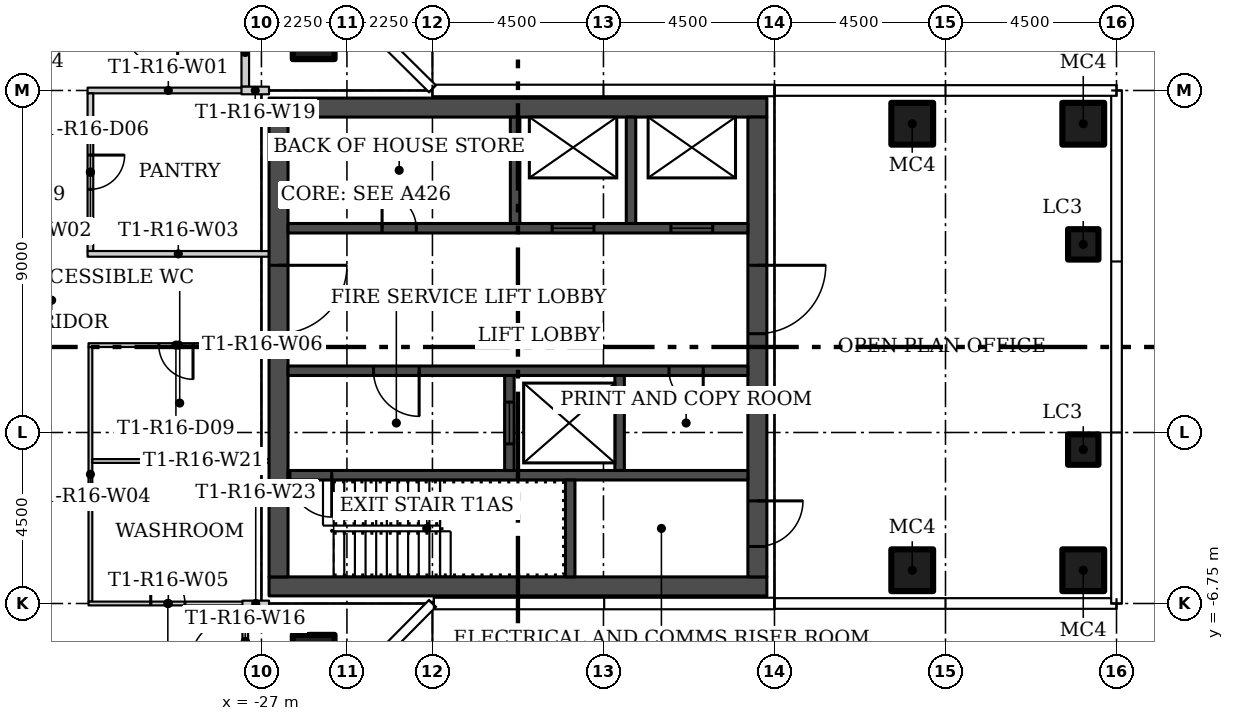
"""IFC4 building model, lengths in metres.
Left out: names, types, materials, properties, quantities, classifications, styles, units other than length and angle.
Written with IfcOpenShell. Run it as: python <this file> out.ifc"""

import sys

from ifc_helpers import new_model, si_unit, direction, frame, frame_2d, origin, origin_2d, place, context, subcontext, project, spatial, rectangle, hollow_rectangle, extrude, element, fill, save


model = new_model("IFC4")
c1 = context("Model", 3, precision=1e-05, world=origin(), true_north=direction((0.0, 1.0)))
c2 = subcontext(c1, "Body", "Model", "MODEL_VIEW")
j1 = project(units=[si_unit("LENGTHUNIT", "METRE"), si_unit("PLANEANGLEUNIT", "RADIAN")], contexts=[c1])
p1 = place(None, origin())
s1 = spatial("IfcSite", under=j1, at=p1, CompositionType="ELEMENT")
p2 = place(p1, origin())
s2 = spatial("IfcBuilding", under=s1, at=p2, CompositionType="ELEMENT")
p3 = place(p2, frame((0.0, 0.0, 146.7)))
s3 = spatial("IfcBuildingStorey", under=s2, at=p3, CompositionType="ELEMENT", Elevation=146.7)
for number, where in (
    (1, (-25.625, 8.125, 0.0)),
    (2, (-25.625, -8.125, 0.0)),
    (3, (-9.875, -5.875, 0.0)),
    (4, (-5.375, -5.875, 0.0)),
    (5, (-9.875, 5.875, 0.0)),
    (6, (-5.375, 5.875, 0.0)),
):
    element("IfcColumn", number, at=place(p3, frame(where)), inside=s3, PredefinedType="COLUMN", context=c2, shape_type="SweptSolid", body=[
        extrude(hollow_rectangle(XDim=1.1, YDim=1.1, WallThickness=0.04, at=origin_2d()), origin(), (0.0, 0.0, 1.0), 3.55),
    ])
for number, where in (
    (7, (-5.375, -2.7, 0.0)),
    (8, (-5.375, 2.7, 0.0)),
):
    element("IfcColumn", number, at=place(p3, frame(where)), inside=s3, PredefinedType="COLUMN", context=c2, shape_type="SweptSolid", body=[
        extrude(hollow_rectangle(XDim=0.8, YDim=0.8, WallThickness=0.03, at=origin_2d()), origin(), (0.0, 0.0, 1.0), 3.55),
    ])
p4 = place(p3, frame((-27.325, 6.75, 0.0), z_axis=(0.0, 0.0, 1.0), x_axis=(-1.0, 0.0, 0.0)))
e9 = element("IfcWall", 9, at=p4, inside=s3, PredefinedType="PARTITIONING", context=c2, shape_type="SweptSolid", body=[
    extrude(rectangle(XDim=4.25, YDim=0.15, at=frame_2d((2.125, 0.0))), origin(), (0.0, 0.0, 1.0), 3.55),
])
p5 = place(p3, frame((-31.5, 6.675, 0.0), z_axis=(0.0, 0.0, 1.0), x_axis=(0.0, -1.0, 0.0)))
e10 = element("IfcWall", 10, at=p5, inside=s3, PredefinedType="PARTITIONING", context=c2, shape_type="SweptSolid", body=[
    extrude(rectangle(XDim=4.15, YDim=0.15, at=frame_2d((2.075, 0.0))), origin(), (0.0, 0.0, 1.0), 3.55),
])
p6 = place(p5, frame((1.625, 0.0, 0.0)))
e11 = element("IfcOpeningElement", 11, at=p6, cuts=e10, PredefinedType="OPENING", context=c2, shape_type="SweptSolid", body=[
    extrude(rectangle(XDim=0.9, YDim=2.1, at=frame_2d((0.45, 1.05))), frame((0.0, 0.085, 0.0), z_axis=(0.0, -1.0, 0.0), x_axis=(1.0, 0.0, 0.0)), (0.0, 0.0, 1.0), 0.17),
])
p7 = place(p3, frame((-31.575, 2.45, 0.0)))
e12 = element("IfcWall", 12, at=p7, inside=s3, PredefinedType="PARTITIONING", context=c2, shape_type="SweptSolid", body=[
    extrude(rectangle(XDim=4.775, YDim=0.15, at=frame_2d((2.387, 0.0))), origin(), (0.0, 0.0, 1.0), 3.55),
])
p8 = place(p3, frame((-31.5, -0.0, 0.0), z_axis=(0.0, 0.0, 1.0), x_axis=(0.0, -1.0, 0.0)))
e13 = element("IfcWall", 13, at=p8, inside=s3, PredefinedType="PARTITIONING", context=c2, shape_type="SweptSolid", body=[
    extrude(rectangle(XDim=6.7, YDim=0.1, at=frame_2d((3.35, 0.0))), origin(), (0.0, 0.0, 1.0), 3.55),
])
p9 = place(p3, frame((-31.55, -6.75, 0.0)))
e14 = element("IfcWall", 14, at=p9, inside=s3, PredefinedType="PARTITIONING", context=c2, shape_type="SweptSolid", body=[
    extrude(rectangle(XDim=4.2, YDim=0.1, at=frame_2d((2.1, 0.0))), origin(), (0.0, 0.0, 1.0), 3.55),
])
p10 = place(p9, frame((1.638, 0.0, 0.0)))
e15 = element("IfcOpeningElement", 15, at=p10, cuts=e14, PredefinedType="OPENING", context=c2, shape_type="SweptSolid", body=[
    extrude(rectangle(XDim=0.9, YDim=2.1, at=frame_2d((0.45, 1.05))), frame((0.0, 0.06, 0.0), z_axis=(0.0, -1.0, 0.0), x_axis=(1.0, 0.0, 0.0)), (0.0, 0.0, 1.0), 0.12),
])
p11 = place(p3, frame((-26.8, 0.05, 0.0), z_axis=(0.0, 0.0, 1.0), x_axis=(-1.0, 0.0, 0.0)))
e16 = element("IfcWall", 16, at=p11, inside=s3, PredefinedType="PARTITIONING", context=c2, shape_type="SweptSolid", body=[
    extrude(rectangle(XDim=4.75, YDim=0.1, at=frame_2d((2.375, 0.0))), origin(), (0.0, 0.0, 1.0), 3.55),
])
p12 = place(p11, frame((2.0, 0.0, 0.0)))
e17 = element("IfcOpeningElement", 17, at=p12, cuts=e16, PredefinedType="OPENING", context=c2, shape_type="SweptSolid", body=[
    extrude(rectangle(XDim=0.9, YDim=2.1, at=frame_2d((0.45, 1.05))), frame((0.0, 0.06, 0.0), z_axis=(0.0, -1.0, 0.0), x_axis=(1.0, 0.0, 0.0)), (0.0, 0.0, 1.0), 0.12),
])
p13 = place(p3, frame((-27.425, 6.85, 0.0), z_axis=(0.0, 0.0, 1.0), x_axis=(0.0, 1.0, 0.0)))
e18 = element("IfcWall", 18, at=p13, inside=s3, PredefinedType="PARTITIONING", context=c2, shape_type="SweptSolid", body=[
    extrude(rectangle(XDim=1.8, YDim=0.2, at=frame_2d((0.9, 0.0))), origin(), (0.0, 0.0, 1.0), 3.55),
])
p14 = place(p3, frame((-27.425, -8.675, 0.0), z_axis=(0.0, 0.0, 1.0), x_axis=(0.0, 1.0, 0.0)))
e19 = element("IfcWall", 19, at=p14, inside=s3, PredefinedType="PARTITIONING", context=c2, shape_type="SweptSolid", body=[
    extrude(rectangle(XDim=1.85, YDim=0.15, at=frame_2d((0.925, 0.0))), origin(), (0.0, 0.0, 1.0), 3.55),
])
p15 = place(p14, frame((0.175, 0.0, 0.0)))
e20 = element("IfcOpeningElement", 20, at=p15, cuts=e19, PredefinedType="OPENING", context=c2, shape_type="SweptSolid", body=[
    extrude(rectangle(XDim=1.5, YDim=2.1, at=frame_2d((0.75, 1.05))), frame((0.0, 0.085, 0.0), z_axis=(0.0, -1.0, 0.0), x_axis=(1.0, 0.0, 0.0)), (0.0, 0.0, 1.0), 0.17),
])
p16 = place(p3, frame((-26.8, 6.75, 0.0), z_axis=(0.0, 0.0, 1.0), x_axis=(-1.0, 0.0, 0.0)))
e21 = element("IfcWall", 21, at=p16, inside=s3, PredefinedType="PARTITIONING", context=c2, shape_type="SweptSolid", body=[
    extrude(rectangle(XDim=0.725, YDim=0.2, at=frame_2d((0.362, 0.0))), origin(), (0.0, 0.0, 1.0), 3.55),
])
p17 = place(p3, frame((-26.8, -3.0, 0.0), z_axis=(0.0, 0.0, 1.0), x_axis=(-1.0, 0.0, 0.0)))
e22 = element("IfcWall", 22, at=p17, inside=s3, PredefinedType="PARTITIONING", context=c2, shape_type="SweptSolid", body=[
    extrude(rectangle(XDim=4.65, YDim=0.1, at=frame_2d((2.325, 0.0))), origin(), (0.0, 0.0, 1.0), 3.55),
])
p18 = place(p3, frame((-27.5, -6.75, 0.0)))
e23 = element("IfcWall", 23, at=p18, inside=s3, PredefinedType="PARTITIONING", context=c2, shape_type="SweptSolid", body=[
    extrude(rectangle(XDim=0.7, YDim=0.15, at=frame_2d((0.35, 0.0))), origin(), (0.0, 0.0, 1.0), 3.55),
])
for number, where in (
    (24, (-26.8, -6.3, 0.0)),
    (25, (-26.8, 6.3, 0.0)),
):
    element("IfcWall", number, at=place(p3, frame(where)), inside=s3, PredefinedType="SHEAR", context=c2, shape_type="SweptSolid", body=[
        extrude(rectangle(XDim=13.1, YDim=0.5, at=frame_2d((6.55, 0.0))), origin(), (0.0, 0.0, 1.0), 3.55),
    ])
p19 = place(p3, frame((-26.55, 6.05, 0.0), z_axis=(0.0, 0.0, 1.0), x_axis=(0.0, -1.0, 0.0)))
e26 = element("IfcWall", 26, at=p19, inside=s3, PredefinedType="SHEAR", context=c2, shape_type="SweptSolid", body=[
    extrude(rectangle(XDim=12.1, YDim=0.5, at=frame_2d((6.05, 0.0))), origin(), (0.0, 0.0, 1.0), 3.55),
])
p20 = place(p19, frame((3.9, 0.0, 0.0)))
e27 = element("IfcOpeningElement", 27, at=p20, cuts=e26, PredefinedType="OPENING", context=c2, shape_type="SweptSolid", body=[
    extrude(rectangle(XDim=1.8, YDim=2.4, at=frame_2d((0.9, 1.2))), frame((0.0, 0.26, 0.0), z_axis=(0.0, -1.0, 0.0), x_axis=(1.0, 0.0, 0.0)), (0.0, 0.0, 1.0), 0.52),
])
p21 = place(p3, frame((-13.95, 6.05, 0.0), z_axis=(0.0, 0.0, 1.0), x_axis=(0.0, -1.0, 0.0)))
e28 = element("IfcWall", 28, at=p21, inside=s3, PredefinedType="SHEAR", context=c2, shape_type="SweptSolid", body=[
    extrude(rectangle(XDim=12.1, YDim=0.5, at=frame_2d((6.05, 0.0))), origin(), (0.0, 0.0, 1.0), 3.55),
])
p22 = place(p21, frame((10.1, 0.0, 0.0)))
e29 = element("IfcOpeningElement", 29, at=p22, cuts=e28, PredefinedType="OPENING", context=c2, shape_type="SweptSolid", body=[
    extrude(rectangle(XDim=1.2, YDim=2.1, at=frame_2d((0.6, 1.05))), frame((0.0, 0.26, 0.0), z_axis=(0.0, -1.0, 0.0), x_axis=(1.0, 0.0, 0.0)), (0.0, 0.0, 1.0), 0.52),
])
p23 = place(p21, frame((3.9, 0.0, 0.0)))
e30 = element("IfcOpeningElement", 30, at=p23, cuts=e28, PredefinedType="OPENING", context=c2, shape_type="SweptSolid", body=[
    extrude(rectangle(XDim=1.8, YDim=2.4, at=frame_2d((0.9, 1.2))), frame((0.0, 0.26, 0.0), z_axis=(0.0, -1.0, 0.0), x_axis=(1.0, 0.0, 0.0)), (0.0, 0.0, 1.0), 0.52),
])
p24 = place(p3, frame((-14.2, -3.375, 0.0), z_axis=(0.0, 0.0, 1.0), x_axis=(-1.0, 0.0, 0.0)))
e31 = element("IfcWall", 31, at=p24, inside=s3, PredefinedType="SHEAR", context=c2, shape_type="SweptSolid", body=[
    extrude(rectangle(XDim=12.1, YDim=0.25, at=frame_2d((6.05, 0.0))), origin(), (0.0, 0.0, 1.0), 3.55),
])
p25 = place(p24, frame((10.95, 0.0, 0.0)))
e32 = element("IfcOpeningElement", 32, at=p25, cuts=e31, PredefinedType="OPENING", context=c2, shape_type="SweptSolid", body=[
    extrude(rectangle(XDim=1.1, YDim=2.1, at=frame_2d((0.55, 1.05))), frame((0.0, 0.135, 0.0), z_axis=(0.0, -1.0, 0.0), x_axis=(1.0, 0.0, 0.0)), (0.0, 0.0, 1.0), 0.27),
])
p26 = place(p3, frame((-18.875, -6.05, 0.0), z_axis=(0.0, 0.0, 1.0), x_axis=(0.0, 1.0, 0.0)))
e33 = element("IfcWall", 33, at=p26, inside=s3, PredefinedType="SHEAR", context=c2, shape_type="SweptSolid", body=[
    extrude(rectangle(XDim=2.55, YDim=0.25, at=frame_2d((1.275, 0.0))), origin(), (0.0, 0.0, 1.0), 3.55),
])
p27 = place(p3, frame((-14.2, -0.625, 0.0), z_axis=(0.0, 0.0, 1.0), x_axis=(-1.0, 0.0, 0.0)))
e34 = element("IfcWall", 34, at=p27, inside=s3, PredefinedType="SHEAR", context=c2, shape_type="SweptSolid", body=[
    extrude(rectangle(XDim=12.1, YDim=0.25, at=frame_2d((6.05, 0.0))), origin(), (0.0, 0.0, 1.0), 3.55),
])
p28 = place(p27, frame((8.65, 0.0, 0.0)))
e35 = element("IfcOpeningElement", 35, at=p28, cuts=e34, PredefinedType="OPENING", context=c2, shape_type="SweptSolid", body=[
    extrude(rectangle(XDim=1.2, YDim=2.1, at=frame_2d((0.6, 1.05))), frame((0.0, 0.135, 0.0), z_axis=(0.0, -1.0, 0.0), x_axis=(1.0, 0.0, 0.0)), (0.0, 0.0, 1.0), 0.27),
])
p29 = place(p27, frame((1.175, 0.0, 0.0)))
e36 = element("IfcOpeningElement", 36, at=p29, cuts=e34, PredefinedType="OPENING", context=c2, shape_type="SweptSolid", body=[
    extrude(rectangle(XDim=0.9, YDim=2.1, at=frame_2d((0.45, 1.05))), frame((0.0, 0.135, 0.0), z_axis=(0.0, -1.0, 0.0), x_axis=(1.0, 0.0, 0.0)), (0.0, 0.0, 1.0), 0.27),
])
p30 = place(p3, frame((-20.475, -3.25, 0.0), z_axis=(0.0, 0.0, 1.0), x_axis=(0.0, 1.0, 0.0)))
e37 = element("IfcWall", 37, at=p30, inside=s3, PredefinedType="SHEAR", context=c2, shape_type="SweptSolid", body=[
    extrude(rectangle(XDim=2.5, YDim=0.25, at=frame_2d((1.25, 0.0))), origin(), (0.0, 0.0, 1.0), 3.55),
])
p31 = place(p30, frame((0.7, 0.0, 0.0)))
e38 = element("IfcOpeningElement", 38, at=p31, cuts=e37, PredefinedType="OPENING", context=c2, shape_type="SweptSolid", body=[
    extrude(rectangle(XDim=1.1, YDim=2.1, at=frame_2d((0.55, 1.05))), frame((0.0, 0.135, 0.0), z_axis=(0.0, -1.0, 0.0), x_axis=(1.0, 0.0, 0.0)), (0.0, 0.0, 1.0), 0.27),
])
p32 = place(p3, frame((-17.575, -3.25, 0.0), z_axis=(0.0, 0.0, 1.0), x_axis=(0.0, 1.0, 0.0)))
e39 = element("IfcWall", 39, at=p32, inside=s3, PredefinedType="SHEAR", context=c2, shape_type="SweptSolid", body=[
    extrude(rectangle(XDim=2.5, YDim=0.25, at=frame_2d((1.25, 0.0))), origin(), (0.0, 0.0, 1.0), 3.55),
])
p33 = place(p3, frame((-26.3, 3.125, 0.0)))
e40 = element("IfcWall", 40, at=p33, inside=s3, PredefinedType="SHEAR", context=c2, shape_type="SweptSolid", body=[
    extrude(rectangle(XDim=12.1, YDim=0.25, at=frame_2d((6.05, 0.0))), origin(), (0.0, 0.0, 1.0), 3.55),
])
p34 = place(p33, frame((6.95, 0.0, 0.0)))
e41 = element("IfcOpeningElement", 41, at=p34, cuts=e40, PredefinedType="OPENING", context=c2, shape_type="SweptSolid", body=[
    extrude(rectangle(XDim=1.1, YDim=2.1, at=frame_2d((0.55, 1.05))), frame((0.0, 0.135, 0.0), z_axis=(0.0, -1.0, 0.0), x_axis=(1.0, 0.0, 0.0)), (0.0, 0.0, 1.0), 0.27),
])
p35 = place(p33, frame((10.075, 0.0, 0.0)))
e42 = element("IfcOpeningElement", 42, at=p35, cuts=e40, PredefinedType="OPENING", context=c2, shape_type="SweptSolid", body=[
    extrude(rectangle(XDim=1.1, YDim=2.1, at=frame_2d((0.55, 1.05))), frame((0.0, 0.135, 0.0), z_axis=(0.0, -1.0, 0.0), x_axis=(1.0, 0.0, 0.0)), (0.0, 0.0, 1.0), 0.27),
])
p36 = place(p33, frame((2.475, 0.0, 0.0)))
e43 = element("IfcOpeningElement", 43, at=p36, cuts=e40, PredefinedType="OPENING", context=c2, shape_type="SweptSolid", body=[
    extrude(rectangle(XDim=0.9, YDim=2.1, at=frame_2d((0.45, 1.05))), frame((0.0, 0.135, 0.0), z_axis=(0.0, -1.0, 0.0), x_axis=(1.0, 0.0, 0.0)), (0.0, 0.0, 1.0), 0.27),
])
for number, where, z_axis, x_axis in (
    (44, (-20.325, 3.25, 0.0), (0.0, 0.0, 1.0), (0.0, 1.0, 0.0)),
    (45, (-17.275, 3.25, 0.0), (0.0, 0.0, 1.0), (0.0, 1.0, 0.0)),
):
    element("IfcWall", number, at=place(p3, frame(where, z_axis=z_axis, x_axis=x_axis)), inside=s3, PredefinedType="SHEAR", context=c2, shape_type="SweptSolid", body=[
        extrude(rectangle(XDim=2.8, YDim=0.25, at=frame_2d((1.4, 0.0))), origin(), (0.0, 0.0, 1.0), 3.55),
    ])
p37 = place(p10, origin())
e46 = element("IfcDoor", 46, at=p37, inside=s3, OperationType="SINGLE_SWING_RIGHT", PredefinedType="DOOR", context=c2, shape_type="SweptSolid", body=[
    extrude(rectangle(XDim=0.9, YDim=2.1, at=frame_2d((0.45, 1.05))), frame((0.0, 0.025, 0.0), z_axis=(0.0, -1.0, 0.0), x_axis=(1.0, 0.0, 0.0)), (0.0, 0.0, 1.0), 0.05),
])
fill(e15, e46)
p38 = place(p6, origin())
e47 = element("IfcDoor", 47, at=p38, inside=s3, OperationType="SINGLE_SWING_LEFT", PredefinedType="DOOR", context=c2, shape_type="SweptSolid", body=[
    extrude(rectangle(XDim=0.9, YDim=2.1, at=frame_2d((0.45, 1.05))), frame((0.0, 0.025, 0.0), z_axis=(0.0, -1.0, 0.0), x_axis=(1.0, 0.0, 0.0)), (0.0, 0.0, 1.0), 0.05),
])
fill(e11, e47)
p39 = place(p15, origin())
e48 = element("IfcDoor", 48, at=p39, inside=s3, OperationType="DOUBLE_DOOR_SINGLE_SWING", PredefinedType="DOOR", context=c2, shape_type="SweptSolid", body=[
    extrude(rectangle(XDim=1.5, YDim=2.1, at=frame_2d((0.75, 1.05))), frame((0.0, 0.025, 0.0), z_axis=(0.0, -1.0, 0.0), x_axis=(1.0, 0.0, 0.0)), (0.0, 0.0, 1.0), 0.05),
])
fill(e20, e48)
p40 = place(p12, origin())
e49 = element("IfcDoor", 49, at=p40, inside=s3, OperationType="SINGLE_SWING_RIGHT", PredefinedType="DOOR", context=c2, shape_type="SweptSolid", body=[
    extrude(rectangle(XDim=0.9, YDim=2.1, at=frame_2d((0.45, 1.05))), frame((0.0, 0.025, 0.0), z_axis=(0.0, -1.0, 0.0), x_axis=(1.0, 0.0, 0.0)), (0.0, 0.0, 1.0), 0.05),
])
fill(e17, e49)
p41 = place(p20, origin())
e50 = element("IfcDoor", 50, at=p41, inside=s3, OperationType="DOUBLE_DOOR_SINGLE_SWING", PredefinedType="DOOR", context=c2, shape_type="SweptSolid", body=[
    extrude(rectangle(XDim=1.8, YDim=2.4, at=frame_2d((0.9, 1.2))), frame((0.0, 0.025, 0.0), z_axis=(0.0, -1.0, 0.0), x_axis=(1.0, 0.0, 0.0)), (0.0, 0.0, 1.0), 0.05),
])
fill(e27, e50)
p42 = place(p22, origin())
e51 = element("IfcDoor", 51, at=p42, inside=s3, OperationType="SINGLE_SWING_RIGHT", PredefinedType="DOOR", context=c2, shape_type="SweptSolid", body=[
    extrude(rectangle(XDim=1.2, YDim=2.1, at=frame_2d((0.6, 1.05))), frame((0.0, 0.025, 0.0), z_axis=(0.0, -1.0, 0.0), x_axis=(1.0, 0.0, 0.0)), (0.0, 0.0, 1.0), 0.05),
])
fill(e29, e51)
p43 = place(p23, origin())
e52 = element("IfcDoor", 52, at=p43, inside=s3, OperationType="DOUBLE_DOOR_SINGLE_SWING", PredefinedType="DOOR", context=c2, shape_type="SweptSolid", body=[
    extrude(rectangle(XDim=1.8, YDim=2.4, at=frame_2d((0.9, 1.2))), frame((0.0, 0.025, 0.0), z_axis=(0.0, -1.0, 0.0), x_axis=(1.0, 0.0, 0.0)), (0.0, 0.0, 1.0), 0.05),
])
fill(e30, e52)
p44 = place(p25, origin())
e53 = element("IfcDoor", 53, at=p44, inside=s3, OperationType="SINGLE_SWING_RIGHT", PredefinedType="DOOR", context=c2, shape_type="SweptSolid", body=[
    extrude(rectangle(XDim=1.1, YDim=2.1, at=frame_2d((0.55, 1.05))), frame((0.0, 0.025, 0.0), z_axis=(0.0, -1.0, 0.0), x_axis=(1.0, 0.0, 0.0)), (0.0, 0.0, 1.0), 0.05),
])
fill(e32, e53)
p45 = place(p28, origin())
e54 = element("IfcDoor", 54, at=p45, inside=s3, OperationType="SINGLE_SWING_RIGHT", PredefinedType="DOOR", context=c2, shape_type="SweptSolid", body=[
    extrude(rectangle(XDim=1.2, YDim=2.1, at=frame_2d((0.6, 1.05))), frame((0.0, 0.025, 0.0), z_axis=(0.0, -1.0, 0.0), x_axis=(1.0, 0.0, 0.0)), (0.0, 0.0, 1.0), 0.05),
])
fill(e35, e54)
p46 = place(p29, origin())
e55 = element("IfcDoor", 55, at=p46, inside=s3, OperationType="SINGLE_SWING_LEFT", PredefinedType="DOOR", context=c2, shape_type="SweptSolid", body=[
    extrude(rectangle(XDim=0.9, YDim=2.1, at=frame_2d((0.45, 1.05))), frame((0.0, 0.025, 0.0), z_axis=(0.0, -1.0, 0.0), x_axis=(1.0, 0.0, 0.0)), (0.0, 0.0, 1.0), 0.05),
])
fill(e36, e55)
p47 = place(p31, origin())
e56 = element("IfcDoor", 56, at=p47, inside=s3, OperationType="SLIDING_TO_LEFT", PredefinedType="DOOR", context=c2, shape_type="SweptSolid", body=[
    extrude(rectangle(XDim=1.1, YDim=2.1, at=frame_2d((0.55, 1.05))), frame((0.0, 0.025, 0.0), z_axis=(0.0, -1.0, 0.0), x_axis=(1.0, 0.0, 0.0)), (0.0, 0.0, 1.0), 0.05),
])
fill(e38, e56)
p48 = place(p34, origin())
e57 = element("IfcDoor", 57, at=p48, inside=s3, OperationType="SLIDING_TO_LEFT", PredefinedType="DOOR", context=c2, shape_type="SweptSolid", body=[
    extrude(rectangle(XDim=1.1, YDim=2.1, at=frame_2d((0.55, 1.05))), frame((0.0, 0.025, 0.0), z_axis=(0.0, -1.0, 0.0), x_axis=(1.0, 0.0, 0.0)), (0.0, 0.0, 1.0), 0.05),
])
fill(e41, e57)
p49 = place(p35, origin())
e58 = element("IfcDoor", 58, at=p49, inside=s3, OperationType="SLIDING_TO_LEFT", PredefinedType="DOOR", context=c2, shape_type="SweptSolid", body=[
    extrude(rectangle(XDim=1.1, YDim=2.1, at=frame_2d((0.55, 1.05))), frame((0.0, 0.025, 0.0), z_axis=(0.0, -1.0, 0.0), x_axis=(1.0, 0.0, 0.0)), (0.0, 0.0, 1.0), 0.05),
])
fill(e42, e58)
p50 = place(p36, origin())
e59 = element("IfcDoor", 59, at=p50, inside=s3, OperationType="SINGLE_SWING_LEFT", PredefinedType="DOOR", context=c2, shape_type="SweptSolid", body=[
    extrude(rectangle(XDim=0.9, YDim=2.1, at=frame_2d((0.45, 1.05))), frame((0.0, 0.025, 0.0), z_axis=(0.0, -1.0, 0.0), x_axis=(1.0, 0.0, 0.0)), (0.0, 0.0, 1.0), 0.05),
])
fill(e43, e59)
save(model, sys.argv[1])
